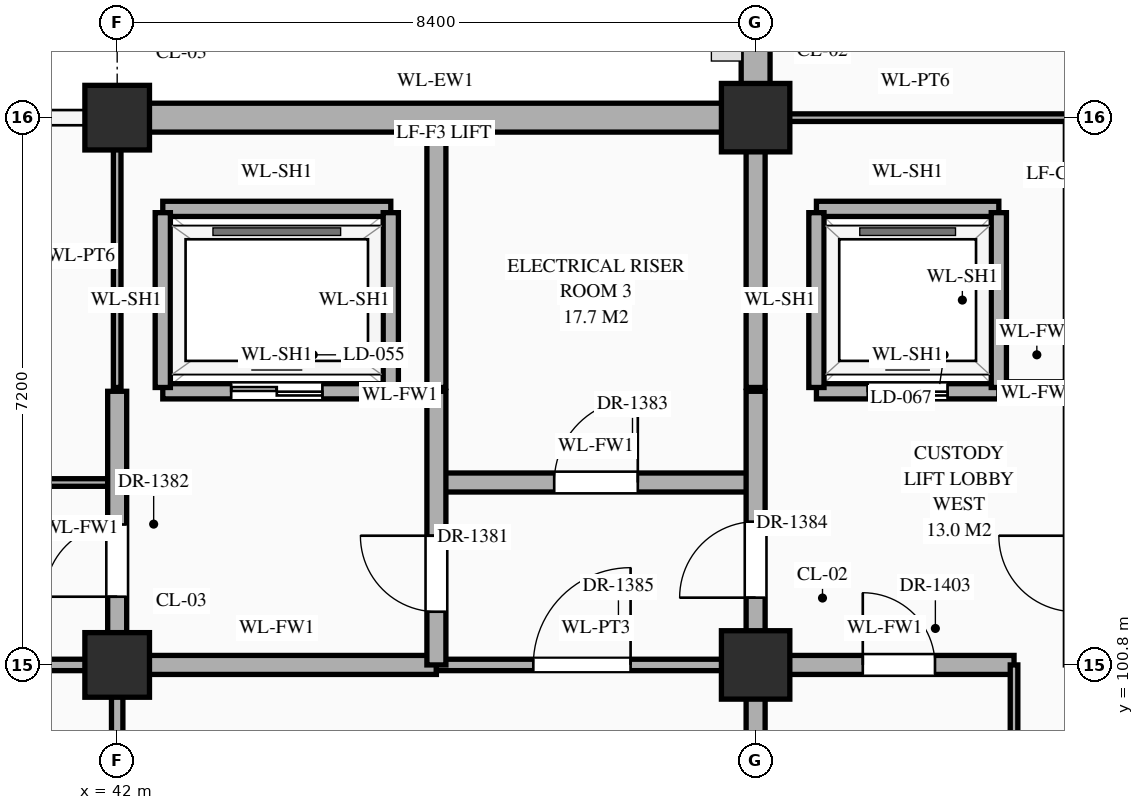
"""IFC4 building model, lengths in metres.
Left out: names, types, materials, properties, quantities, classifications, styles, units other than length and angle.
Written with IfcOpenShell. Run it as: python <this file> out.ifc"""

import sys

from ifc_helpers import new_model, si_unit, direction, frame, frame_2d, origin, origin_2d, place, context, subcontext, project, spatial, rectangle, extrude, element, fill, save


model = new_model("IFC4")
c1 = context("Model", 3, precision=1e-05, world=origin(), true_north=direction((0.0, 1.0)))
c2 = subcontext(c1, "Body", "Model", "MODEL_VIEW")
j1 = project(units=[si_unit("LENGTHUNIT", "METRE"), si_unit("PLANEANGLEUNIT", "RADIAN")], contexts=[c1])
p1 = place(None, origin())
s1 = spatial("IfcSite", under=j1, at=p1, CompositionType="ELEMENT")
p2 = place(p1, origin())
s2 = spatial("IfcBuilding", under=s1, at=p2, CompositionType="ELEMENT")
p3 = place(p2, frame((0.0, 0.0, 10.8)))
s3 = spatial("IfcBuildingStorey", under=s2, at=p3, CompositionType="ELEMENT", Elevation=10.8)
for number, where, z_axis, x_axis in (
    (1, (42.0, 100.8, 0.0), (0.0, 0.0, 1.0), (1.0, 0.0, 0.0)),
    (2, (42.0, 108.0, 0.0), (0.0, 0.0, 1.0), (1.0, 0.0, 0.0)),
):
    element("IfcColumn", number, at=place(p3, frame(where, z_axis=z_axis, x_axis=x_axis)), inside=s3, PredefinedType="COLUMN", context=c2, shape_type="SweptSolid", body=[
        extrude(rectangle(XDim=0.85, YDim=0.85, at=origin_2d()), origin(), (0.0, 0.0, 1.0), 5.4),
    ])
for number, where, z_axis, x_axis in (
    (3, (50.4, 100.8, 0.0), (0.0, 0.0, 1.0), (1.0, 0.0, 0.0)),
    (4, (50.4, 108.0, 0.0), (0.0, 0.0, 1.0), (1.0, 0.0, 0.0)),
):
    element("IfcColumn", number, at=place(p3, frame(where, z_axis=z_axis, x_axis=x_axis)), inside=s3, PredefinedType="COLUMN", context=c2, shape_type="SweptSolid", body=[
        extrude(rectangle(XDim=0.9, YDim=0.9, at=origin_2d()), origin(), (0.0, 0.0, 1.0), 5.4),
    ])
p4 = place(p3, frame((42.42, 108.0, 0.0), z_axis=(0.0, 0.0, 1.0), x_axis=(1.0, 0.0, 0.0)))
e5 = element("IfcWall", 5, at=p4, inside=s3, PredefinedType="STANDARD", context=c2, shape_type="SweptSolid", body=[
    extrude(rectangle(XDim=7.535, YDim=0.38, at=frame_2d((3.768, 0.0))), origin(), (0.0, 0.0, 1.0), 4.47),
])
p5 = place(p3, frame((50.4, 108.445, 0.0), z_axis=(0.0, 0.0, 1.0), x_axis=(0.0, 1.0, 0.0)))
e6 = element("IfcWall", 6, at=p5, inside=s3, PredefinedType="STANDARD", context=c2, shape_type="SweptSolid", body=[
    extrude(rectangle(XDim=6.335, YDim=0.38, at=frame_2d((3.167, 0.0))), origin(), (0.0, 0.0, 1.0), 4.47),
])
p6 = place(p5, frame((3.93, 0.0, 0.85)))
e7 = element("IfcOpeningElement", 7, at=p6, cuts=e6, PredefinedType="OPENING", context=c2, shape_type="SweptSolid", body=[
    extrude(rectangle(XDim=1.05, YDim=1.92, at=frame_2d((0.525, 0.96))), frame((0.0, 0.202, 0.0), z_axis=(0.0, -1.0, 0.0), x_axis=(1.0, 0.0, 0.0)), (0.0, 0.0, 1.0), 0.404),
])
p7 = place(p3, frame((31.0, 100.8, 0.0), z_axis=(0.0, 0.0, 1.0), x_axis=(1.0, 0.0, 0.0)))
e8 = element("IfcWall", 8, at=p7, inside=s3, PredefinedType="STANDARD", context=c2, shape_type="SweptSolid", body=[
    extrude(rectangle(XDim=11.0, YDim=0.15, at=frame_2d((5.5, 0.0))), origin(), (0.0, 0.0, 1.0), 4.27),
])
p8 = place(p7, frame((0.698, 0.0, 0.0)))
e9 = element("IfcOpeningElement", 9, at=p8, cuts=e8, PredefinedType="OPENING", context=c2, shape_type="SweptSolid", body=[
    extrude(rectangle(XDim=0.86, YDim=2.1, at=frame_2d((0.43, 1.05))), frame((0.0, 0.087, 0.0), z_axis=(0.0, -1.0, 0.0), x_axis=(1.0, 0.0, 0.0)), (0.0, 0.0, 1.0), 0.174),
])
p9 = place(p7, frame((6.34, 0.0, 0.0)))
e10 = element("IfcOpeningElement", 10, at=p9, cuts=e8, PredefinedType="OPENING", context=c2, shape_type="SweptSolid", body=[
    extrude(rectangle(XDim=0.92, YDim=2.15, at=frame_2d((0.46, 1.075))), frame((0.0, 0.087, 0.0), z_axis=(0.0, -1.0, 0.0), x_axis=(1.0, 0.0, 0.0)), (0.0, 0.0, 1.0), 0.174),
])
p10 = place(p3, frame((42.0, 100.8, 0.0), z_axis=(0.0, 0.0, 1.0), x_axis=(1.0, 0.0, 0.0)))
e11 = element("IfcWall", 11, at=p10, inside=s3, PredefinedType="STANDARD", context=c2, shape_type="SweptSolid", body=[
    extrude(rectangle(XDim=4.2, YDim=0.25, at=frame_2d((2.1, 0.0))), origin(), (0.0, 0.0, 1.0), 4.27),
])
p11 = place(p3, frame((46.2, 100.8, 0.0), z_axis=(0.0, 0.0, 1.0), x_axis=(1.0, 0.0, 0.0)))
e12 = element("IfcWall", 12, at=p11, inside=s3, PredefinedType="STANDARD", context=c2, shape_type="SweptSolid", body=[
    extrude(rectangle(XDim=4.2, YDim=0.15, at=frame_2d((2.1, 0.0))), origin(), (0.0, 0.0, 1.0), 4.27),
])
p12 = place(p11, frame((1.275, 0.0, 0.0)))
e13 = element("IfcOpeningElement", 13, at=p12, cuts=e12, PredefinedType="OPENING", context=c2, shape_type="SweptSolid", body=[
    extrude(rectangle(XDim=1.28, YDim=2.35, at=frame_2d((0.64, 1.175))), frame((0.0, 0.087, 0.0), z_axis=(0.0, -1.0, 0.0), x_axis=(1.0, 0.0, 0.0)), (0.0, 0.0, 1.0), 0.174),
])
p13 = place(p3, frame((50.4, 100.8, 0.0), z_axis=(0.0, 0.0, 1.0), x_axis=(1.0, 0.0, 0.0)))
e14 = element("IfcWall", 14, at=p13, inside=s3, PredefinedType="STANDARD", context=c2, shape_type="SweptSolid", body=[
    extrude(rectangle(XDim=3.4, YDim=0.25, at=frame_2d((1.7, 0.0))), origin(), (0.0, 0.0, 1.0), 4.27),
])
p14 = place(p13, frame((1.41, 0.0, 0.0)))
e15 = element("IfcOpeningElement", 15, at=p14, cuts=e14, PredefinedType="OPENING", context=c2, shape_type="SweptSolid", body=[
    extrude(rectangle(XDim=0.95, YDim=2.15, at=frame_2d((0.475, 1.075))), frame((0.0, 0.137, 0.0), z_axis=(0.0, -1.0, 0.0), x_axis=(1.0, 0.0, 0.0)), (0.0, 0.0, 1.0), 0.274),
])
p15 = place(p3, frame((0.04, 103.2, 0.0), z_axis=(0.0, 0.0, 1.0), x_axis=(1.0, 0.0, 0.0)))
e16 = element("IfcWall", 16, at=p15, inside=s3, PredefinedType="STANDARD", context=c2, shape_type="SweptSolid", body=[
    extrude(rectangle(XDim=41.96, YDim=0.1, at=frame_2d((20.98, 0.0))), origin(), (0.0, 0.0, 1.0), 5.12),
])
p16 = place(p15, frame((3.64, 0.0, 0.0)))
e17 = element("IfcOpeningElement", 17, at=p16, cuts=e16, PredefinedType="OPENING", context=c2, shape_type="SweptSolid", body=[
    extrude(rectangle(XDim=1.08, YDim=2.25, at=frame_2d((0.54, 1.125))), frame((0.0, 0.062, 0.0), z_axis=(0.0, -1.0, 0.0), x_axis=(1.0, 0.0, 0.0)), (0.0, 0.0, 1.0), 0.124),
])
p17 = place(p15, frame((12.0, 0.0, 0.0)))
e18 = element("IfcOpeningElement", 18, at=p17, cuts=e16, PredefinedType="OPENING", context=c2, shape_type="SweptSolid", body=[
    extrude(rectangle(XDim=1.12, YDim=2.25, at=frame_2d((0.56, 1.125))), frame((0.0, 0.062, 0.0), z_axis=(0.0, -1.0, 0.0), x_axis=(1.0, 0.0, 0.0)), (0.0, 0.0, 1.0), 0.124),
])
p18 = place(p15, frame((20.38, 0.0, 0.0)))
e19 = element("IfcOpeningElement", 19, at=p18, cuts=e16, PredefinedType="OPENING", context=c2, shape_type="SweptSolid", body=[
    extrude(rectangle(XDim=1.16, YDim=2.3, at=frame_2d((0.58, 1.15))), frame((0.0, 0.062, 0.0), z_axis=(0.0, -1.0, 0.0), x_axis=(1.0, 0.0, 0.0)), (0.0, 0.0, 1.0), 0.124),
])
p19 = place(p15, frame((28.76, 0.0, 0.0)))
e20 = element("IfcOpeningElement", 20, at=p19, cuts=e16, PredefinedType="OPENING", context=c2, shape_type="SweptSolid", body=[
    extrude(rectangle(XDim=1.2, YDim=2.35, at=frame_2d((0.6, 1.175))), frame((0.0, 0.062, 0.0), z_axis=(0.0, -1.0, 0.0), x_axis=(1.0, 0.0, 0.0)), (0.0, 0.0, 1.0), 0.124),
])
p20 = place(p15, frame((37.14, 0.0, 0.0)))
e21 = element("IfcOpeningElement", 21, at=p20, cuts=e16, PredefinedType="OPENING", context=c2, shape_type="SweptSolid", body=[
    extrude(rectangle(XDim=1.24, YDim=2.3, at=frame_2d((0.62, 1.15))), frame((0.0, 0.062, 0.0), z_axis=(0.0, -1.0, 0.0), x_axis=(1.0, 0.0, 0.0)), (0.0, 0.0, 1.0), 0.124),
])
p21 = place(p3, frame((46.2, 103.2, 0.0), z_axis=(0.0, 0.0, 1.0), x_axis=(1.0, 0.0, 0.0)))
e22 = element("IfcWall", 22, at=p21, inside=s3, PredefinedType="STANDARD", context=c2, shape_type="SweptSolid", body=[
    extrude(rectangle(XDim=4.2, YDim=0.25, at=frame_2d((2.1, 0.0))), origin(), (0.0, 0.0, 1.0), 5.12),
])
p22 = place(p21, frame((1.55, 0.0, 0.0)))
e23 = element("IfcOpeningElement", 23, at=p22, cuts=e22, PredefinedType="OPENING", context=c2, shape_type="SweptSolid", body=[
    extrude(rectangle(XDim=1.1, YDim=2.2, at=frame_2d((0.55, 1.1))), frame((0.0, 0.137, 0.0), z_axis=(0.0, -1.0, 0.0), x_axis=(1.0, 0.0, 0.0)), (0.0, 0.0, 1.0), 0.274),
])
p23 = place(p3, frame((42.6, 104.4, 0.0), z_axis=(0.0, 0.0, 1.0), x_axis=(1.0, 0.0, 0.0)))
e24 = element("IfcWall", 24, at=p23, inside=s3, PredefinedType="STANDARD", context=c2, shape_type="SweptSolid", body=[
    extrude(rectangle(XDim=3.0, YDim=0.2, at=frame_2d((1.5, 0.0))), origin(), (0.0, 0.0, 1.0), 5.12),
])
p24 = place(p23, frame((0.9, 0.0, 0.0)))
e25 = element("IfcOpeningElement", 25, at=p24, cuts=e24, PredefinedType="OPENING", context=c2, shape_type="SweptSolid", body=[
    extrude(rectangle(XDim=1.2, YDim=2.15, at=frame_2d((0.6, 1.075))), frame((0.0, 0.112, 0.0), z_axis=(0.0, -1.0, 0.0), x_axis=(1.0, 0.0, 0.0)), (0.0, 0.0, 1.0), 0.224),
])
p25 = place(p3, frame((51.2, 104.4, 0.0), z_axis=(0.0, 0.0, 1.0), x_axis=(1.0, 0.0, 0.0)))
e26 = element("IfcWall", 26, at=p25, inside=s3, PredefinedType="STANDARD", context=c2, shape_type="SweptSolid", body=[
    extrude(rectangle(XDim=2.4, YDim=0.2, at=frame_2d((1.2, 0.0))), origin(), (0.0, 0.0, 1.0), 5.12),
])
p26 = place(p25, frame((0.675, 0.0, 0.0)))
e27 = element("IfcOpeningElement", 27, at=p26, cuts=e26, PredefinedType="OPENING", context=c2, shape_type="SweptSolid", body=[
    extrude(rectangle(XDim=1.05, YDim=2.15, at=frame_2d((0.525, 1.075))), frame((0.0, 0.112, 0.0), z_axis=(0.0, -1.0, 0.0), x_axis=(1.0, 0.0, 0.0)), (0.0, 0.0, 1.0), 0.224),
])
p27 = place(p3, frame((53.65, 104.4, 0.0), z_axis=(0.0, 0.0, 1.0), x_axis=(1.0, 0.0, 0.0)))
e28 = element("IfcWall", 28, at=p27, inside=s3, PredefinedType="STANDARD", context=c2, shape_type="SweptSolid", body=[
    extrude(rectangle(XDim=0.9, YDim=0.25, at=frame_2d((0.45, 0.0))), origin(), (0.0, 0.0, 1.0), 5.12),
])
p28 = place(p3, frame((42.6, 106.8, 0.0), z_axis=(0.0, 0.0, 1.0), x_axis=(1.0, 0.0, 0.0)))
e29 = element("IfcWall", 29, at=p28, inside=s3, PredefinedType="STANDARD", context=c2, shape_type="SweptSolid", body=[
    extrude(rectangle(XDim=3.0, YDim=0.2, at=frame_2d((1.5, 0.0))), origin(), (0.0, 0.0, 1.0), 5.12),
])
p29 = place(p3, frame((51.2, 106.8, 0.0), z_axis=(0.0, 0.0, 1.0), x_axis=(1.0, 0.0, 0.0)))
e30 = element("IfcWall", 30, at=p29, inside=s3, PredefinedType="STANDARD", context=c2, shape_type="SweptSolid", body=[
    extrude(rectangle(XDim=2.4, YDim=0.2, at=frame_2d((1.2, 0.0))), origin(), (0.0, 0.0, 1.0), 5.12),
])
p30 = place(p3, frame((50.45, 108.0, 0.0), z_axis=(0.0, 0.0, 1.0), x_axis=(1.0, 0.0, 0.0)))
e31 = element("IfcWall", 31, at=p30, inside=s3, PredefinedType="STANDARD", context=c2, shape_type="SweptSolid", body=[
    extrude(rectangle(XDim=4.1, YDim=0.1, at=frame_2d((2.05, 0.0))), origin(), (0.0, 0.0, 1.0), 4.27),
])
p31 = place(p3, frame((42.0, 96.0, 0.0), z_axis=(0.0, 0.0, 1.0), x_axis=(0.0, 1.0, 0.0)))
e32 = element("IfcWall", 32, at=p31, inside=s3, PredefinedType="STANDARD", context=c2, shape_type="SweptSolid", body=[
    extrude(rectangle(XDim=4.8, YDim=0.15, at=frame_2d((2.4, 0.0))), origin(), (0.0, 0.0, 1.0), 4.37),
])
p32 = place(p3, frame((42.0, 100.8, 0.0), z_axis=(0.0, 0.0, 1.0), x_axis=(0.0, 1.0, 0.0)))
e33 = element("IfcWall", 33, at=p32, inside=s3, PredefinedType="STANDARD", context=c2, shape_type="SweptSolid", body=[
    extrude(rectangle(XDim=3.6, YDim=0.25, at=frame_2d((1.8, 0.0))), origin(), (0.0, 0.0, 1.0), 4.37),
])
p33 = place(p32, frame((0.897, 0.0, 0.0)))
e34 = element("IfcOpeningElement", 34, at=p33, cuts=e33, PredefinedType="OPENING", context=c2, shape_type="SweptSolid", body=[
    extrude(rectangle(XDim=0.95, YDim=2.15, at=frame_2d((0.475, 1.075))), frame((0.0, 0.137, 0.0), z_axis=(0.0, -1.0, 0.0), x_axis=(1.0, 0.0, 0.0)), (0.0, 0.0, 1.0), 0.274),
])
p34 = place(p3, frame((42.0, 104.45, 0.0), z_axis=(0.0, 0.0, 1.0), x_axis=(0.0, 1.0, 0.0)))
e35 = element("IfcWall", 35, at=p34, inside=s3, PredefinedType="STANDARD", context=c2, shape_type="SweptSolid", body=[
    extrude(rectangle(XDim=3.46, YDim=0.1, at=frame_2d((1.73, 0.0))), origin(), (0.0, 0.0, 1.0), 4.37),
])
for number, where, z_axis, x_axis in (
    (36, (42.6, 104.45, 0.0), (0.0, 0.0, 1.0), (0.0, 1.0, 0.0)),
    (37, (45.6, 104.45, 0.0), (0.0, 0.0, 1.0), (0.0, 1.0, 0.0)),
):
    element("IfcWall", number, at=place(p3, frame(where, z_axis=z_axis, x_axis=x_axis)), inside=s3, PredefinedType="STANDARD", context=c2, shape_type="SweptSolid", body=[
        extrude(rectangle(XDim=2.3, YDim=0.2, at=frame_2d((1.15, 0.0))), origin(), (0.0, 0.0, 1.0), 5.12),
    ])
p35 = place(p3, frame((46.2, 100.8, 0.0), z_axis=(0.0, 0.0, 1.0), x_axis=(0.0, 1.0, 0.0)))
e38 = element("IfcWall", 38, at=p35, inside=s3, PredefinedType="STANDARD", context=c2, shape_type="SweptSolid", body=[
    extrude(rectangle(XDim=3.6, YDim=0.25, at=frame_2d((1.8, 0.0))), origin(), (0.0, 0.0, 1.0), 4.72),
])
p36 = place(p35, frame((0.7, 0.0, 0.0)))
e39 = element("IfcOpeningElement", 39, at=p36, cuts=e38, PredefinedType="OPENING", context=c2, shape_type="SweptSolid", body=[
    extrude(rectangle(XDim=1.0, YDim=2.2, at=frame_2d((0.5, 1.1))), frame((0.0, 0.137, 0.0), z_axis=(0.0, -1.0, 0.0), x_axis=(1.0, 0.0, 0.0)), (0.0, 0.0, 1.0), 0.274),
])
p37 = place(p3, frame((46.2, 104.45, 0.0), z_axis=(0.0, 0.0, 1.0), x_axis=(0.0, 1.0, 0.0)))
e40 = element("IfcWall", 40, at=p37, inside=s3, PredefinedType="STANDARD", context=c2, shape_type="SweptSolid", body=[
    extrude(rectangle(XDim=3.46, YDim=0.25, at=frame_2d((1.73, 0.0))), origin(), (0.0, 0.0, 1.0), 4.72),
])
p38 = place(p3, frame((50.4, 91.2, 0.0), z_axis=(0.0, 0.0, 1.0), x_axis=(0.0, 1.0, 0.0)))
e41 = element("IfcWall", 41, at=p38, inside=s3, PredefinedType="STANDARD", context=c2, shape_type="SweptSolid", body=[
    extrude(rectangle(XDim=13.2, YDim=0.25, at=frame_2d((6.6, 0.0))), origin(), (0.0, 0.0, 1.0), 4.37),
])
p39 = place(p38, frame((0.465, 0.0, 0.0)))
e42 = element("IfcOpeningElement", 42, at=p39, cuts=e41, PredefinedType="OPENING", context=c2, shape_type="SweptSolid", body=[
    extrude(rectangle(XDim=1.1, YDim=2.2, at=frame_2d((0.55, 1.1))), frame((0.0, 0.137, 0.0), z_axis=(0.0, -1.0, 0.0), x_axis=(1.0, 0.0, 0.0)), (0.0, 0.0, 1.0), 0.274),
])
p40 = place(p38, frame((10.485, 0.0, 0.0)))
e43 = element("IfcOpeningElement", 43, at=p40, cuts=e41, PredefinedType="OPENING", context=c2, shape_type="SweptSolid", body=[
    extrude(rectangle(XDim=1.0, YDim=2.2, at=frame_2d((0.5, 1.1))), frame((0.0, 0.137, 0.0), z_axis=(0.0, -1.0, 0.0), x_axis=(1.0, 0.0, 0.0)), (0.0, 0.0, 1.0), 0.274),
])
p41 = place(p38, frame((3.285, 0.0, 0.0)))
e44 = element("IfcOpeningElement", 44, at=p41, cuts=e41, PredefinedType="OPENING", context=c2, shape_type="SweptSolid", body=[
    extrude(rectangle(XDim=1.0, YDim=2.2, at=frame_2d((0.5, 1.1))), frame((0.0, 0.137, 0.0), z_axis=(0.0, -1.0, 0.0), x_axis=(1.0, 0.0, 0.0)), (0.0, 0.0, 1.0), 0.274),
])
p42 = place(p3, frame((50.4, 104.45, 0.0), z_axis=(0.0, 0.0, 1.0), x_axis=(0.0, 1.0, 0.0)))
e45 = element("IfcWall", 45, at=p42, inside=s3, PredefinedType="STANDARD", context=c2, shape_type="SweptSolid", body=[
    extrude(rectangle(XDim=3.46, YDim=0.25, at=frame_2d((1.73, 0.0))), origin(), (0.0, 0.0, 1.0), 4.37),
])
for number, where, z_axis, x_axis in (
    (46, (51.2, 104.45, 0.0), (0.0, 0.0, 1.0), (0.0, 1.0, 0.0)),
    (47, (53.6, 104.45, 0.0), (0.0, 0.0, 1.0), (0.0, 1.0, 0.0)),
):
    element("IfcWall", number, at=place(p3, frame(where, z_axis=z_axis, x_axis=x_axis)), inside=s3, PredefinedType="STANDARD", context=c2, shape_type="SweptSolid", body=[
        extrude(rectangle(XDim=2.3, YDim=0.2, at=frame_2d((1.15, 0.0))), origin(), (0.0, 0.0, 1.0), 5.12),
    ])
p43 = place(p3, frame((53.8, 96.0, 0.0), z_axis=(0.0, 0.0, 1.0), x_axis=(0.0, 1.0, 0.0)))
e48 = element("IfcWall", 48, at=p43, inside=s3, PredefinedType="STANDARD", context=c2, shape_type="SweptSolid", body=[
    extrude(rectangle(XDim=4.8, YDim=0.1, at=frame_2d((2.4, 0.0))), origin(), (0.0, 0.0, 1.0), 5.12),
])
p44 = place(p43, frame((1.92, 0.0, 0.0)))
e49 = element("IfcOpeningElement", 49, at=p44, cuts=e48, PredefinedType="OPENING", context=c2, shape_type="SweptSolid", body=[
    extrude(rectangle(XDim=0.96, YDim=2.2, at=frame_2d((0.48, 1.1))), frame((0.0, 0.062, 0.0), z_axis=(0.0, -1.0, 0.0), x_axis=(1.0, 0.0, 0.0)), (0.0, 0.0, 1.0), 0.124),
])
p45 = place(p24, origin())
e50 = element("IfcDoor", 50, at=p45, inside=s3, OperationType="DOUBLE_DOOR_SLIDING", PredefinedType="DOOR", context=c2, shape_type="SweptSolid", body=[
    extrude(rectangle(XDim=1.2, YDim=2.15, at=frame_2d((0.6, 1.075))), frame((0.0, 0.025, 0.0), z_axis=(0.0, -1.0, 0.0), x_axis=(1.0, 0.0, 0.0)), (0.0, 0.0, 1.0), 0.05),
])
fill(e25, e50)
p46 = place(p26, origin())
e51 = element("IfcDoor", 51, at=p46, inside=s3, OperationType="DOUBLE_DOOR_SLIDING", PredefinedType="DOOR", context=c2, shape_type="SweptSolid", body=[
    extrude(rectangle(XDim=1.05, YDim=2.15, at=frame_2d((0.525, 1.075))), frame((0.0, 0.025, 0.0), z_axis=(0.0, -1.0, 0.0), x_axis=(1.0, 0.0, 0.0)), (0.0, 0.0, 1.0), 0.05),
])
fill(e27, e51)
p47 = place(p36, origin())
e52 = element("IfcDoor", 52, at=p47, inside=s3, OperationType="SINGLE_SWING_RIGHT", PredefinedType="DOOR", context=c2, shape_type="SweptSolid", body=[
    extrude(rectangle(XDim=1.0, YDim=2.2, at=frame_2d((0.5, 1.1))), frame((0.0, 0.025, 0.0), z_axis=(0.0, -1.0, 0.0), x_axis=(1.0, 0.0, 0.0)), (0.0, 0.0, 1.0), 0.05),
])
fill(e39, e52)
p48 = place(p33, origin())
e53 = element("IfcDoor", 53, at=p48, inside=s3, OperationType="SINGLE_SWING_LEFT", PredefinedType="DOOR", context=c2, shape_type="SweptSolid", body=[
    extrude(rectangle(XDim=0.95, YDim=2.15, at=frame_2d((0.475, 1.075))), frame((0.0, 0.025, 0.0), z_axis=(0.0, -1.0, 0.0), x_axis=(1.0, 0.0, 0.0)), (0.0, 0.0, 1.0), 0.05),
])
fill(e34, e53)
p49 = place(p22, origin())
e54 = element("IfcDoor", 54, at=p49, inside=s3, OperationType="SINGLE_SWING_RIGHT", PredefinedType="DOOR", context=c2, shape_type="SweptSolid", body=[
    extrude(rectangle(XDim=1.1, YDim=2.2, at=frame_2d((0.55, 1.1))), frame((0.0, 0.025, 0.0), z_axis=(0.0, -1.0, 0.0), x_axis=(1.0, 0.0, 0.0)), (0.0, 0.0, 1.0), 0.05),
])
fill(e23, e54)
p50 = place(p40, origin())
e55 = element("IfcDoor", 55, at=p50, inside=s3, OperationType="SINGLE_SWING_LEFT", PredefinedType="DOOR", context=c2, shape_type="SweptSolid", body=[
    extrude(rectangle(XDim=1.0, YDim=2.2, at=frame_2d((0.5, 1.1))), frame((0.0, 0.025, 0.0), z_axis=(0.0, -1.0, 0.0), x_axis=(1.0, 0.0, 0.0)), (0.0, 0.0, 1.0), 0.05),
])
fill(e43, e55)
p51 = place(p12, origin())
e56 = element("IfcDoor", 56, at=p51, inside=s3, OperationType="SINGLE_SWING_RIGHT", PredefinedType="DOOR", context=c2, shape_type="SweptSolid", body=[
    extrude(rectangle(XDim=1.28, YDim=2.35, at=frame_2d((0.64, 1.175))), frame((0.0, 0.025, 0.0), z_axis=(0.0, -1.0, 0.0), x_axis=(1.0, 0.0, 0.0)), (0.0, 0.0, 1.0), 0.05),
])
fill(e13, e56)
p52 = place(p14, origin())
e57 = element("IfcDoor", 57, at=p52, inside=s3, OperationType="SINGLE_SWING_LEFT", PredefinedType="DOOR", context=c2, shape_type="SweptSolid", body=[
    extrude(rectangle(XDim=0.95, YDim=2.15, at=frame_2d((0.475, 1.075))), frame((0.0, 0.025, 0.0), z_axis=(0.0, -1.0, 0.0), x_axis=(1.0, 0.0, 0.0)), (0.0, 0.0, 1.0), 0.05),
])
fill(e15, e57)
save(model, sys.argv[1])
